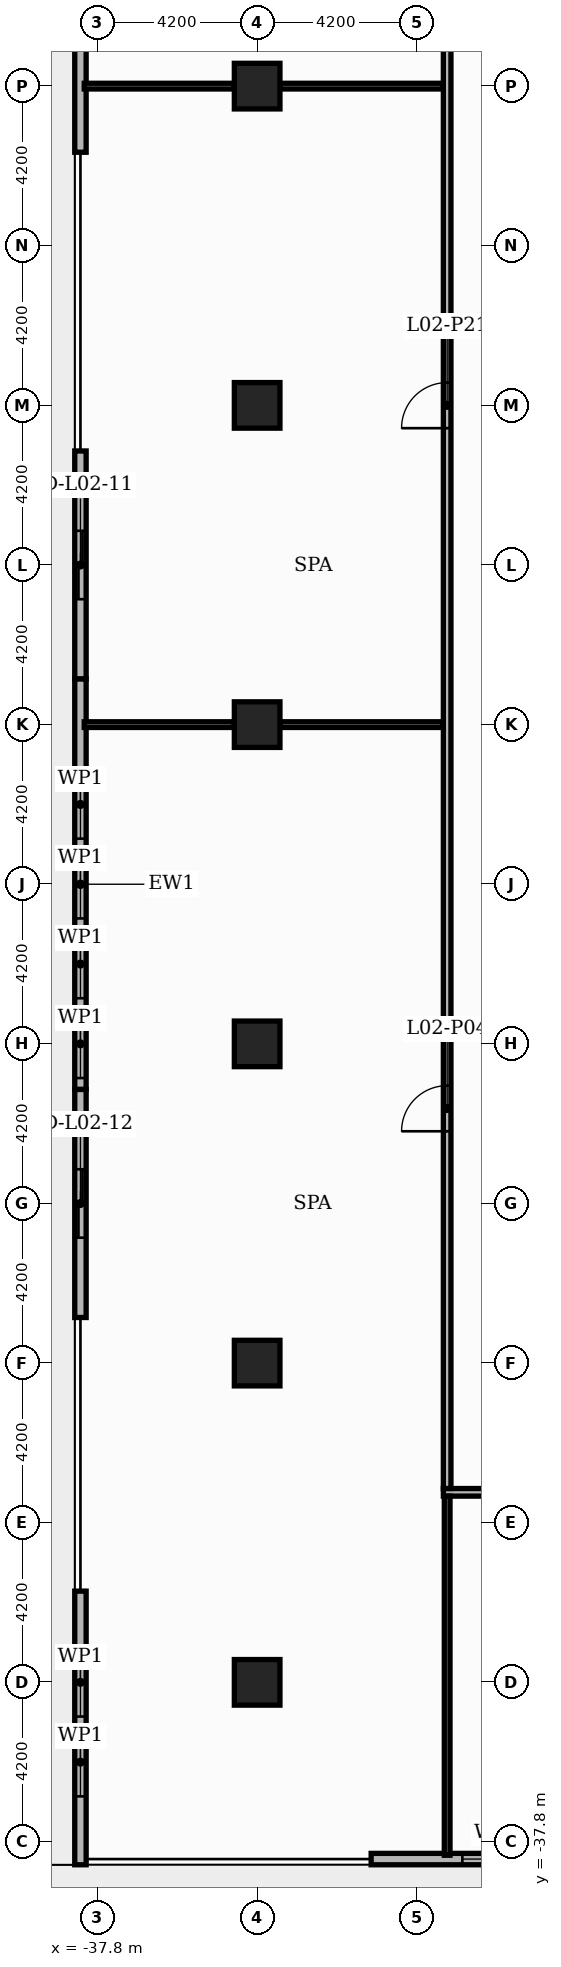
"""IFC4 building model, lengths in metres.
Left out: names, types, materials, properties, quantities, classifications, styles, units other than length and angle.
Written with IfcOpenShell. Run it as: python <this file> out.ifc"""

import sys

from ifc_helpers import new_model, si_unit, direction, frame, frame_2d, origin, origin_2d, place, context, subcontext, project, spatial, rectangle, extrude, element, fill, save


model = new_model("IFC4")
c1 = context("Model", 3, precision=1e-05, world=origin(), true_north=direction((0.0, 1.0)))
c2 = subcontext(c1, "Body", "Model", "MODEL_VIEW")
j1 = project(units=[si_unit("LENGTHUNIT", "METRE"), si_unit("PLANEANGLEUNIT", "RADIAN")], contexts=[c1])
p1 = place(None, origin())
s1 = spatial("IfcSite", under=j1, at=p1, CompositionType="ELEMENT")
p2 = place(p1, origin())
s2 = spatial("IfcBuilding", under=s1, at=p2, CompositionType="ELEMENT")
p3 = place(p2, frame((0.0, 0.0, 12.0)))
s3 = spatial("IfcBuildingStorey", under=s2, at=p3, CompositionType="ELEMENT", Elevation=12.0)
for number, where, z_axis, x_axis in (
    (1, (-33.6, 0.0, 0.0), (0.0, 0.0, 1.0), (1.0, 0.0, 0.0)),
    (2, (-33.6, 8.4, 0.0), (0.0, 0.0, 1.0), (1.0, 0.0, 0.0)),
    (3, (-33.6, -8.4, 0.0), (0.0, 0.0, 1.0), (1.0, 0.0, 0.0)),
    (4, (-33.6, -16.8, 0.0), (0.0, 0.0, 1.0), (1.0, 0.0, 0.0)),
    (5, (-33.6, -25.2, 0.0), (0.0, 0.0, 1.0), (1.0, 0.0, 0.0)),
    (6, (-33.6, -33.6, 0.0), (0.0, 0.0, 1.0), (1.0, 0.0, 0.0)),
):
    element("IfcColumn", number, at=place(p3, frame(where, z_axis=z_axis, x_axis=x_axis)), inside=s3, PredefinedType="COLUMN", context=c2, shape_type="SweptSolid", body=[
        extrude(rectangle(XDim=1.2, YDim=1.2, at=origin_2d()), origin(), (0.0, 0.0, 1.0), 4.8),
    ])
p4 = place(p3, frame((-30.6, -38.25, 0.0), z_axis=(0.0, 0.0, 1.0), x_axis=(1.0, 0.0, 0.0)))
e7 = element("IfcWall", 7, at=p4, inside=s3, PredefinedType="STANDARD", context=c2, shape_type="SweptSolid", body=[
    extrude(rectangle(XDim=7.5, YDim=0.3, at=frame_2d((3.75, 0.0))), origin(), (0.0, 0.0, 1.0), 4.38),
])
p5 = place(p4, frame((2.4, 0.0, 0.6)))
e8 = element("IfcOpeningElement", 8, at=p5, cuts=e7, PredefinedType="OPENING", context=c2, shape_type="SweptSolid", body=[
    extrude(rectangle(XDim=1.8, YDim=3.0, at=frame_2d((0.9, 1.5))), frame((0.0, 0.16, 0.0), z_axis=(0.0, -1.0, 0.0), x_axis=(1.0, 0.0, 0.0)), (0.0, 0.0, 1.0), 0.32),
])
p6 = place(p4, frame((4.5, 0.0, 0.6)))
e9 = element("IfcOpeningElement", 9, at=p6, cuts=e7, PredefinedType="OPENING", context=c2, shape_type="SweptSolid", body=[
    extrude(rectangle(XDim=1.8, YDim=3.0, at=frame_2d((0.9, 1.5))), frame((0.0, 0.16, 0.0), z_axis=(0.0, -1.0, 0.0), x_axis=(1.0, 0.0, 0.0)), (0.0, 0.0, 1.0), 0.32),
])
p7 = place(p3, frame((-38.25, 14.52, 0.0), z_axis=(0.0, 0.0, 1.0), x_axis=(0.0, -1.0, 0.0)))
e10 = element("IfcWall", 10, at=p7, inside=s3, PredefinedType="STANDARD", context=c2, shape_type="SweptSolid", body=[
    extrude(rectangle(XDim=7.86, YDim=0.3, at=frame_2d((3.93, 0.0))), origin(), (0.0, 0.0, 1.0), 4.38),
])
p8 = place(p7, frame((1.02, 0.0, 0.6)))
e11 = element("IfcOpeningElement", 11, at=p8, cuts=e10, PredefinedType="OPENING", context=c2, shape_type="SweptSolid", body=[
    extrude(rectangle(XDim=1.8, YDim=3.0, at=frame_2d((0.9, 1.5))), frame((0.0, 0.16, 0.0), z_axis=(0.0, -1.0, 0.0), x_axis=(1.0, 0.0, 0.0)), (0.0, 0.0, 1.0), 0.32),
])
p9 = place(p7, frame((3.12, 0.0, 0.6)))
e12 = element("IfcOpeningElement", 12, at=p9, cuts=e10, PredefinedType="OPENING", context=c2, shape_type="SweptSolid", body=[
    extrude(rectangle(XDim=1.8, YDim=3.0, at=frame_2d((0.9, 1.5))), frame((0.0, 0.16, 0.0), z_axis=(0.0, -1.0, 0.0), x_axis=(1.0, 0.0, 0.0)), (0.0, 0.0, 1.0), 0.32),
])
p10 = place(p3, frame((-38.25, -1.2, 0.0), z_axis=(0.0, 0.0, 1.0), x_axis=(0.0, -1.0, 0.0)))
e13 = element("IfcWall", 13, at=p10, inside=s3, PredefinedType="STANDARD", context=c2, shape_type="SweptSolid", body=[
    extrude(rectangle(XDim=6.0, YDim=0.3, at=frame_2d((3.0, 0.0))), origin(), (0.0, 0.0, 1.0), 4.38),
])
p11 = place(p10, frame((2.1, 0.0, 0.0)))
e14 = element("IfcOpeningElement", 14, at=p11, cuts=e13, PredefinedType="OPENING", context=c2, shape_type="SweptSolid", body=[
    extrude(rectangle(XDim=1.8, YDim=2.4, at=frame_2d((0.9, 1.2))), frame((0.0, 0.16, 0.0), z_axis=(0.0, -1.0, 0.0), x_axis=(1.0, 0.0, 0.0)), (0.0, 0.0, 1.0), 0.32),
])
p12 = place(p3, frame((-38.25, -7.2, 0.0), z_axis=(0.0, 0.0, 1.0), x_axis=(0.0, -1.0, 0.0)))
e15 = element("IfcWall", 15, at=p12, inside=s3, PredefinedType="STANDARD", context=c2, shape_type="SweptSolid", body=[
    extrude(rectangle(XDim=10.8, YDim=0.3, at=frame_2d((5.4, 0.0))), origin(), (0.0, 0.0, 1.0), 4.38),
])
p13 = place(p12, frame((2.4, 0.0, 0.6)))
e16 = element("IfcOpeningElement", 16, at=p13, cuts=e15, PredefinedType="OPENING", context=c2, shape_type="SweptSolid", body=[
    extrude(rectangle(XDim=1.8, YDim=3.0, at=frame_2d((0.9, 1.5))), frame((0.0, 0.16, 0.0), z_axis=(0.0, -1.0, 0.0), x_axis=(1.0, 0.0, 0.0)), (0.0, 0.0, 1.0), 0.32),
])
p14 = place(p12, frame((4.5, 0.0, 0.6)))
e17 = element("IfcOpeningElement", 17, at=p14, cuts=e15, PredefinedType="OPENING", context=c2, shape_type="SweptSolid", body=[
    extrude(rectangle(XDim=1.8, YDim=3.0, at=frame_2d((0.9, 1.5))), frame((0.0, 0.16, 0.0), z_axis=(0.0, -1.0, 0.0), x_axis=(1.0, 0.0, 0.0)), (0.0, 0.0, 1.0), 0.32),
])
p15 = place(p12, frame((6.6, 0.0, 0.6)))
e18 = element("IfcOpeningElement", 18, at=p15, cuts=e15, PredefinedType="OPENING", context=c2, shape_type="SweptSolid", body=[
    extrude(rectangle(XDim=1.8, YDim=3.0, at=frame_2d((0.9, 1.5))), frame((0.0, 0.16, 0.0), z_axis=(0.0, -1.0, 0.0), x_axis=(1.0, 0.0, 0.0)), (0.0, 0.0, 1.0), 0.32),
])
p16 = place(p12, frame((8.7, 0.0, 0.6)))
e19 = element("IfcOpeningElement", 19, at=p16, cuts=e15, PredefinedType="OPENING", context=c2, shape_type="SweptSolid", body=[
    extrude(rectangle(XDim=1.8, YDim=3.0, at=frame_2d((0.9, 1.5))), frame((0.0, 0.16, 0.0), z_axis=(0.0, -1.0, 0.0), x_axis=(1.0, 0.0, 0.0)), (0.0, 0.0, 1.0), 0.32),
])
p17 = place(p3, frame((-38.25, -18.0, 0.0), z_axis=(0.0, 0.0, 1.0), x_axis=(0.0, -1.0, 0.0)))
e20 = element("IfcWall", 20, at=p17, inside=s3, PredefinedType="STANDARD", context=c2, shape_type="SweptSolid", body=[
    extrude(rectangle(XDim=6.0, YDim=0.3, at=frame_2d((3.0, 0.0))), origin(), (0.0, 0.0, 1.0), 4.38),
])
p18 = place(p17, frame((2.1, 0.0, 0.0)))
e21 = element("IfcOpeningElement", 21, at=p18, cuts=e20, PredefinedType="OPENING", context=c2, shape_type="SweptSolid", body=[
    extrude(rectangle(XDim=1.8, YDim=2.4, at=frame_2d((0.9, 1.2))), frame((0.0, 0.16, 0.0), z_axis=(0.0, -1.0, 0.0), x_axis=(1.0, 0.0, 0.0)), (0.0, 0.0, 1.0), 0.32),
])
p19 = place(p3, frame((-38.25, -31.2, 0.0), z_axis=(0.0, 0.0, 1.0), x_axis=(0.0, -1.0, 0.0)))
e22 = element("IfcWall", 22, at=p19, inside=s3, PredefinedType="STANDARD", context=c2, shape_type="SweptSolid", body=[
    extrude(rectangle(XDim=7.2, YDim=0.3, at=frame_2d((3.6, 0.0))), origin(), (0.0, 0.0, 1.0), 4.38),
])
p20 = place(p19, frame((1.5, 0.0, 0.6)))
e23 = element("IfcOpeningElement", 23, at=p20, cuts=e22, PredefinedType="OPENING", context=c2, shape_type="SweptSolid", body=[
    extrude(rectangle(XDim=1.8, YDim=3.0, at=frame_2d((0.9, 1.5))), frame((0.0, 0.16, 0.0), z_axis=(0.0, -1.0, 0.0), x_axis=(1.0, 0.0, 0.0)), (0.0, 0.0, 1.0), 0.32),
])
p21 = place(p19, frame((3.6, 0.0, 0.6)))
e24 = element("IfcOpeningElement", 24, at=p21, cuts=e22, PredefinedType="OPENING", context=c2, shape_type="SweptSolid", body=[
    extrude(rectangle(XDim=1.8, YDim=3.0, at=frame_2d((0.9, 1.5))), frame((0.0, 0.16, 0.0), z_axis=(0.0, -1.0, 0.0), x_axis=(1.0, 0.0, 0.0)), (0.0, 0.0, 1.0), 0.32),
])
p22 = place(p3, frame((-28.7, -28.6, 0.0), z_axis=(0.0, 0.0, 1.0), x_axis=(1.0, 0.0, 0.0)))
e25 = element("IfcWall", 25, at=p22, inside=s3, PredefinedType="PARTITIONING", context=c2, shape_type="SweptSolid", body=[
    extrude(rectangle(XDim=57.4, YDim=0.2, at=frame_2d((28.7, 0.0))), origin(), (0.0, 0.0, 1.0), 4.08),
])
p23 = place(p22, frame((13.8, 0.0, 0.0)))
e26 = element("IfcOpeningElement", 26, at=p23, cuts=e25, PredefinedType="OPENING", context=c2, shape_type="SweptSolid", body=[
    extrude(rectangle(XDim=1.2, YDim=2.2, at=frame_2d((0.6, 1.1))), frame((0.0, 0.11, 0.0), z_axis=(0.0, -1.0, 0.0), x_axis=(1.0, 0.0, 0.0)), (0.0, 0.0, 1.0), 0.22),
])
p24 = place(p22, frame((42.4, 0.0, 0.0)))
e27 = element("IfcOpeningElement", 27, at=p24, cuts=e25, PredefinedType="OPENING", context=c2, shape_type="SweptSolid", body=[
    extrude(rectangle(XDim=1.2, YDim=2.2, at=frame_2d((0.6, 1.1))), frame((0.0, 0.11, 0.0), z_axis=(0.0, -1.0, 0.0), x_axis=(1.0, 0.0, 0.0)), (0.0, 0.0, 1.0), 0.22),
])
p25 = place(p3, frame((-38.15, -8.4, 0.0), z_axis=(0.0, 0.0, 1.0), x_axis=(1.0, 0.0, 0.0)))
e28 = element("IfcWall", 28, at=p25, inside=s3, PredefinedType="PARTITIONING", context=c2, shape_type="SweptSolid", body=[
    extrude(rectangle(XDim=3.95, YDim=0.15, at=frame_2d((1.975, 0.0))), origin(), (0.0, 0.0, 1.0), 4.18),
])
p26 = place(p3, frame((-33.0, -8.4, 0.0), z_axis=(0.0, 0.0, 1.0), x_axis=(1.0, 0.0, 0.0)))
e29 = element("IfcWall", 29, at=p26, inside=s3, PredefinedType="PARTITIONING", context=c2, shape_type="SweptSolid", body=[
    extrude(rectangle(XDim=4.3, YDim=0.15, at=frame_2d((2.15, 0.0))), origin(), (0.0, 0.0, 1.0), 4.18),
])
p27 = place(p3, frame((-38.15, 8.4, 0.0), z_axis=(0.0, 0.0, 1.0), x_axis=(1.0, 0.0, 0.0)))
e30 = element("IfcWall", 30, at=p27, inside=s3, PredefinedType="PARTITIONING", context=c2, shape_type="SweptSolid", body=[
    extrude(rectangle(XDim=3.95, YDim=0.15, at=frame_2d((1.975, 0.0))), origin(), (0.0, 0.0, 1.0), 4.18),
])
p28 = place(p3, frame((-33.0, 8.4, 0.0), z_axis=(0.0, 0.0, 1.0), x_axis=(1.0, 0.0, 0.0)))
e31 = element("IfcWall", 31, at=p28, inside=s3, PredefinedType="PARTITIONING", context=c2, shape_type="SweptSolid", body=[
    extrude(rectangle(XDim=4.3, YDim=0.15, at=frame_2d((2.15, 0.0))), origin(), (0.0, 0.0, 1.0), 4.18),
])
p29 = place(p3, frame((-28.6, -38.15, 0.0), z_axis=(0.0, 0.0, 1.0), x_axis=(0.0, 1.0, 0.0)))
e32 = element("IfcWall", 32, at=p29, inside=s3, PredefinedType="PARTITIONING", context=c2, shape_type="SweptSolid", body=[
    extrude(rectangle(XDim=9.45, YDim=0.15, at=frame_2d((4.725, 0.0))), origin(), (0.0, 0.0, 1.0), 4.18),
])
p30 = place(p3, frame((-28.6, -28.5, 0.0), z_axis=(0.0, 0.0, 1.0), x_axis=(0.0, 1.0, 0.0)))
e33 = element("IfcWall", 33, at=p30, inside=s3, PredefinedType="PARTITIONING", context=c2, shape_type="SweptSolid", body=[
    extrude(rectangle(XDim=57.0, YDim=0.2, at=frame_2d((28.5, 0.0))), origin(), (0.0, 0.0, 1.0), 4.18),
])
p31 = place(p30, frame((9.4, 0.0, 0.0)))
e34 = element("IfcOpeningElement", 34, at=p31, cuts=e33, PredefinedType="OPENING", context=c2, shape_type="SweptSolid", body=[
    extrude(rectangle(XDim=1.2, YDim=2.2, at=frame_2d((0.6, 1.1))), frame((0.0, 0.11, 0.0), z_axis=(0.0, -1.0, 0.0), x_axis=(1.0, 0.0, 0.0)), (0.0, 0.0, 1.0), 0.22),
])
p32 = place(p30, frame((27.9, 0.0, 0.0)))
e35 = element("IfcOpeningElement", 35, at=p32, cuts=e33, PredefinedType="OPENING", context=c2, shape_type="SweptSolid", body=[
    extrude(rectangle(XDim=1.2, YDim=2.2, at=frame_2d((0.6, 1.1))), frame((0.0, 0.11, 0.0), z_axis=(0.0, -1.0, 0.0), x_axis=(1.0, 0.0, 0.0)), (0.0, 0.0, 1.0), 0.22),
])
p33 = place(p30, frame((46.4, 0.0, 0.0)))
e36 = element("IfcOpeningElement", 36, at=p33, cuts=e33, PredefinedType="OPENING", context=c2, shape_type="SweptSolid", body=[
    extrude(rectangle(XDim=1.2, YDim=2.2, at=frame_2d((0.6, 1.1))), frame((0.0, 0.11, 0.0), z_axis=(0.0, -1.0, 0.0), x_axis=(1.0, 0.0, 0.0)), (0.0, 0.0, 1.0), 0.22),
])
p34 = place(p5, origin())
e37 = element("IfcWindow", 37, at=p34, inside=s3, PartitioningType="SINGLE_PANEL", PredefinedType="WINDOW", context=c2, shape_type="SweptSolid", body=[
    extrude(rectangle(XDim=1.8, YDim=3.0, at=frame_2d((0.9, 1.5))), frame((0.0, 0.03, 0.0), z_axis=(0.0, -1.0, 0.0), x_axis=(1.0, 0.0, 0.0)), (0.0, 0.0, 1.0), 0.06),
])
fill(e8, e37)
p35 = place(p11, origin())
e38 = element("IfcDoor", 38, at=p35, inside=s3, OperationType="SLIDING_TO_LEFT", PredefinedType="DOOR", context=c2, shape_type="SweptSolid", body=[
    extrude(rectangle(XDim=1.8, YDim=2.4, at=frame_2d((0.9, 1.2))), frame((0.0, 0.025, 0.0), z_axis=(0.0, -1.0, 0.0), x_axis=(1.0, 0.0, 0.0)), (0.0, 0.0, 1.0), 0.05),
])
fill(e14, e38)
p36 = place(p13, origin())
e39 = element("IfcWindow", 39, at=p36, inside=s3, PartitioningType="SINGLE_PANEL", PredefinedType="WINDOW", context=c2, shape_type="SweptSolid", body=[
    extrude(rectangle(XDim=1.8, YDim=3.0, at=frame_2d((0.9, 1.5))), frame((0.0, 0.03, 0.0), z_axis=(0.0, -1.0, 0.0), x_axis=(1.0, 0.0, 0.0)), (0.0, 0.0, 1.0), 0.06),
])
fill(e16, e39)
p37 = place(p14, origin())
e40 = element("IfcWindow", 40, at=p37, inside=s3, PartitioningType="SINGLE_PANEL", PredefinedType="WINDOW", context=c2, shape_type="SweptSolid", body=[
    extrude(rectangle(XDim=1.8, YDim=3.0, at=frame_2d((0.9, 1.5))), frame((0.0, 0.03, 0.0), z_axis=(0.0, -1.0, 0.0), x_axis=(1.0, 0.0, 0.0)), (0.0, 0.0, 1.0), 0.06),
])
fill(e17, e40)
p38 = place(p15, origin())
e41 = element("IfcWindow", 41, at=p38, inside=s3, PartitioningType="SINGLE_PANEL", PredefinedType="WINDOW", context=c2, shape_type="SweptSolid", body=[
    extrude(rectangle(XDim=1.8, YDim=3.0, at=frame_2d((0.9, 1.5))), frame((0.0, 0.03, 0.0), z_axis=(0.0, -1.0, 0.0), x_axis=(1.0, 0.0, 0.0)), (0.0, 0.0, 1.0), 0.06),
])
fill(e18, e41)
p39 = place(p16, origin())
e42 = element("IfcWindow", 42, at=p39, inside=s3, PartitioningType="SINGLE_PANEL", PredefinedType="WINDOW", context=c2, shape_type="SweptSolid", body=[
    extrude(rectangle(XDim=1.8, YDim=3.0, at=frame_2d((0.9, 1.5))), frame((0.0, 0.03, 0.0), z_axis=(0.0, -1.0, 0.0), x_axis=(1.0, 0.0, 0.0)), (0.0, 0.0, 1.0), 0.06),
])
fill(e19, e42)
p40 = place(p18, origin())
e43 = element("IfcDoor", 43, at=p40, inside=s3, OperationType="SLIDING_TO_LEFT", PredefinedType="DOOR", context=c2, shape_type="SweptSolid", body=[
    extrude(rectangle(XDim=1.8, YDim=2.4, at=frame_2d((0.9, 1.2))), frame((0.0, 0.025, 0.0), z_axis=(0.0, -1.0, 0.0), x_axis=(1.0, 0.0, 0.0)), (0.0, 0.0, 1.0), 0.05),
])
fill(e21, e43)
p41 = place(p20, origin())
e44 = element("IfcWindow", 44, at=p41, inside=s3, PartitioningType="SINGLE_PANEL", PredefinedType="WINDOW", context=c2, shape_type="SweptSolid", body=[
    extrude(rectangle(XDim=1.8, YDim=3.0, at=frame_2d((0.9, 1.5))), frame((0.0, 0.03, 0.0), z_axis=(0.0, -1.0, 0.0), x_axis=(1.0, 0.0, 0.0)), (0.0, 0.0, 1.0), 0.06),
])
fill(e23, e44)
p42 = place(p21, origin())
e45 = element("IfcWindow", 45, at=p42, inside=s3, PartitioningType="SINGLE_PANEL", PredefinedType="WINDOW", context=c2, shape_type="SweptSolid", body=[
    extrude(rectangle(XDim=1.8, YDim=3.0, at=frame_2d((0.9, 1.5))), frame((0.0, 0.03, 0.0), z_axis=(0.0, -1.0, 0.0), x_axis=(1.0, 0.0, 0.0)), (0.0, 0.0, 1.0), 0.06),
])
fill(e24, e45)
p43 = place(p31, origin())
e46 = element("IfcDoor", 46, at=p43, inside=s3, OperationType="SINGLE_SWING_LEFT", PredefinedType="DOOR", context=c2, shape_type="SweptSolid", body=[
    extrude(rectangle(XDim=1.2, YDim=2.2, at=frame_2d((0.6, 1.1))), frame((0.0, 0.025, 0.0), z_axis=(0.0, -1.0, 0.0), x_axis=(1.0, 0.0, 0.0)), (0.0, 0.0, 1.0), 0.05),
])
fill(e34, e46)
p44 = place(p32, origin())
e47 = element("IfcDoor", 47, at=p44, inside=s3, OperationType="SINGLE_SWING_LEFT", PredefinedType="DOOR", context=c2, shape_type="SweptSolid", body=[
    extrude(rectangle(XDim=1.2, YDim=2.2, at=frame_2d((0.6, 1.1))), frame((0.0, 0.025, 0.0), z_axis=(0.0, -1.0, 0.0), x_axis=(1.0, 0.0, 0.0)), (0.0, 0.0, 1.0), 0.05),
])
fill(e35, e47)
save(model, sys.argv[1])
